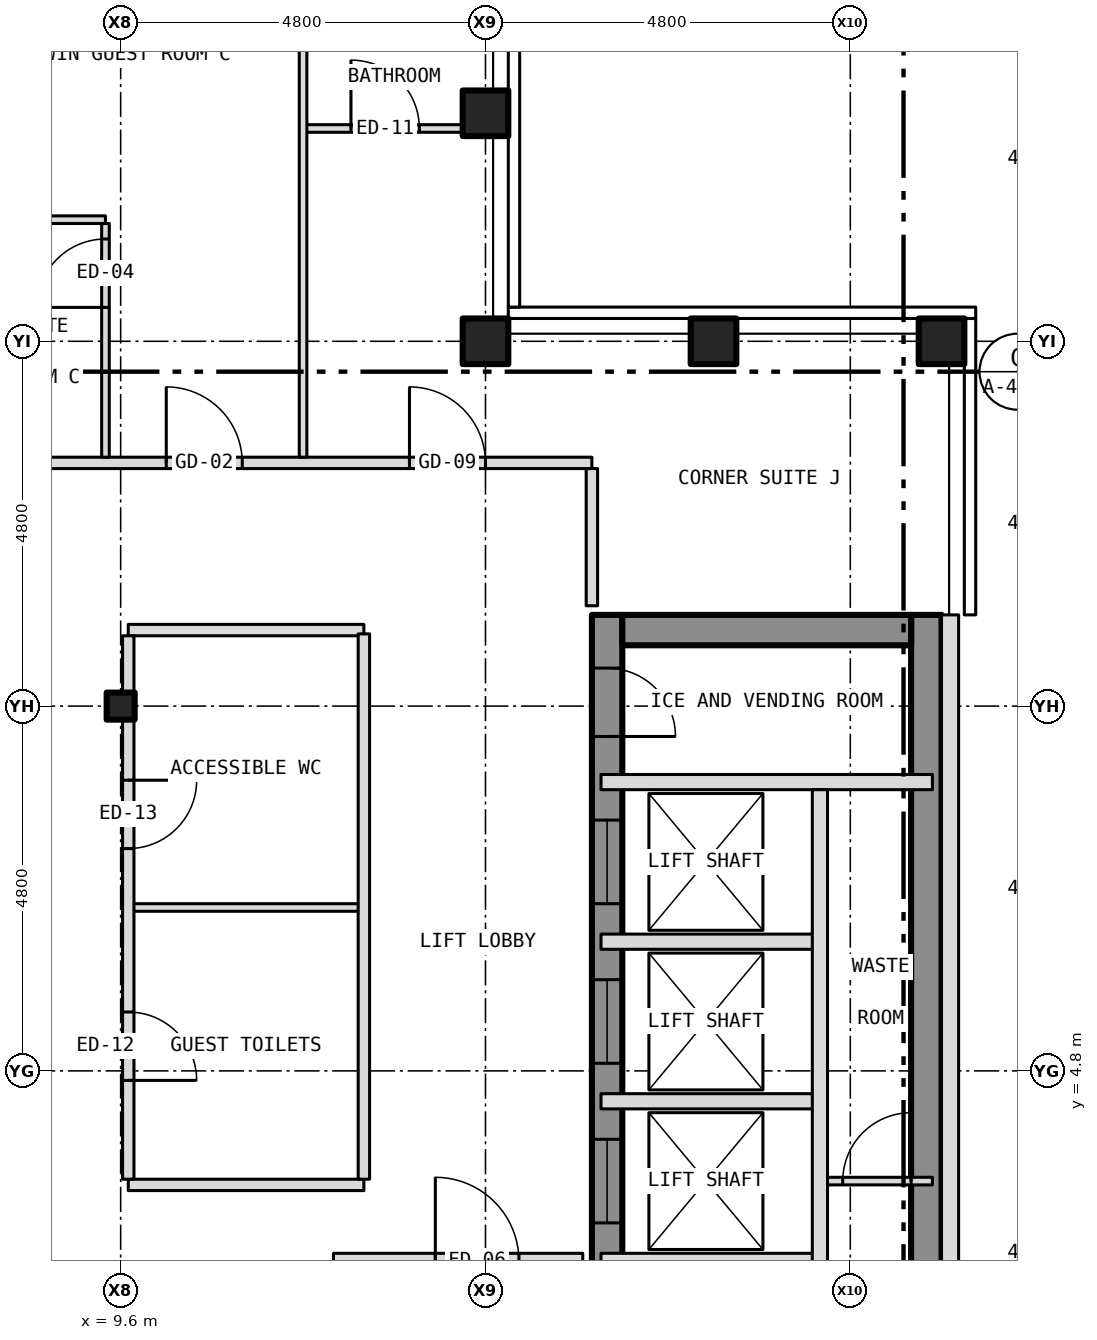
"""IFC4 building model, lengths in metres.
Left out: names, types, materials, properties, quantities, classifications, styles, units other than length and angle.
Written with IfcOpenShell. Run it as: python <this file> out.ifc"""

import sys

from ifc_helpers import new_model, si_unit, direction, frame, frame_2d, origin, origin_2d, place, context, subcontext, project, spatial, rectangle, hollow_rectangle, i_section, extrude, element, fill, save


model = new_model("IFC4")
c1 = context("Model", 3, precision=1e-05, world=origin(), true_north=direction((0.0, 1.0)))
c2 = subcontext(c1, "Body", "Model", "MODEL_VIEW")
j1 = project(units=[si_unit("LENGTHUNIT", "METRE"), si_unit("PLANEANGLEUNIT", "RADIAN")], contexts=[c1])
p1 = place(None, origin())
s1 = spatial("IfcSite", under=j1, at=p1, CompositionType="ELEMENT")
p2 = place(p1, origin())
s2 = spatial("IfcBuilding", under=s1, at=p2, CompositionType="ELEMENT")
p3 = place(p2, frame((0.0, 0.0, 241.0)))
s3 = spatial("IfcBuildingStorey", under=s2, at=p3, CompositionType="ELEMENT", Elevation=241.0)
for number, where, z_axis, x_axis in (
    (1, (20.4, 14.4, -0.15), (0.0, 0.0, 1.0), (1.0, 0.0, 0.0)),
    (2, (14.4, 14.4, -0.15), (0.0, 0.0, 1.0), (1.0, 0.0, 0.0)),
    (3, (14.4, 17.4, -0.15), (0.0, 0.0, 1.0), (1.0, 0.0, 0.0)),
    (4, (17.4, 14.4, -0.15), (0.0, 0.0, 1.0), (1.0, 0.0, 0.0)),
):
    element("IfcColumn", number, at=place(p3, frame(where, z_axis=z_axis, x_axis=x_axis)), inside=s3, PredefinedType="COLUMN", context=c2, shape_type="SweptSolid", body=[
        extrude(hollow_rectangle(XDim=0.6, YDim=0.6, WallThickness=0.03, at=origin_2d()), origin(), (0.0, 0.0, 1.0), 3.5),
    ])
p4 = place(p3, frame((9.6, 9.6, -0.15), z_axis=(0.0, 0.0, 1.0), x_axis=(1.0, 0.0, 0.0)))
e5 = element("IfcColumn", 5, at=p4, inside=s3, PredefinedType="COLUMN", context=c2, shape_type="SweptSolid", body=[
    extrude(i_section(OverallWidth=0.368, OverallDepth=0.356, WebThickness=0.011, FlangeThickness=0.018, at=origin_2d()), origin(), (0.0, 0.0, 1.0), 3.5),
])
p5 = place(p3, frame((16.0, -10.8, 0.0), z_axis=(0.0, 0.0, 1.0), x_axis=(0.0, 1.0, 0.0)))
e6 = element("IfcWall", 6, at=p5, inside=s3, PredefinedType="SHEAR", context=c2, shape_type="SweptSolid", body=[
    extrude(rectangle(XDim=21.6, YDim=0.4, at=frame_2d((10.8, 0.0))), origin(), (0.0, 0.0, 1.0), 3.25),
])
p6 = place(p5, frame((9.4, 0.0, 0.0)))
e7 = element("IfcOpeningElement", 7, at=p6, cuts=e6, PredefinedType="OPENING", context=c2, shape_type="SweptSolid", body=[
    extrude(rectangle(XDim=1.1, YDim=2.1, at=frame_2d((0.55, 1.05))), frame((0.0, 0.212, 0.0), z_axis=(0.0, -1.0, 0.0), x_axis=(1.0, 0.0, 0.0)), (0.0, 0.0, 1.0), 0.424),
])
p7 = place(p5, frame((11.5, 0.0, 0.0)))
e8 = element("IfcOpeningElement", 8, at=p7, cuts=e6, PredefinedType="OPENING", context=c2, shape_type="SweptSolid", body=[
    extrude(rectangle(XDim=1.1, YDim=2.1, at=frame_2d((0.55, 1.05))), frame((0.0, 0.212, 0.0), z_axis=(0.0, -1.0, 0.0), x_axis=(1.0, 0.0, 0.0)), (0.0, 0.0, 1.0), 0.424),
])
p8 = place(p5, frame((13.6, 0.0, 0.0)))
e9 = element("IfcOpeningElement", 9, at=p8, cuts=e6, PredefinedType="OPENING", context=c2, shape_type="SweptSolid", body=[
    extrude(rectangle(XDim=1.1, YDim=2.1, at=frame_2d((0.55, 1.05))), frame((0.0, 0.212, 0.0), z_axis=(0.0, -1.0, 0.0), x_axis=(1.0, 0.0, 0.0)), (0.0, 0.0, 1.0), 0.424),
])
p9 = place(p5, frame((15.7, 0.0, 0.0)))
e10 = element("IfcOpeningElement", 10, at=p9, cuts=e6, PredefinedType="OPENING", context=c2, shape_type="SweptSolid", body=[
    extrude(rectangle(XDim=1.1, YDim=2.1, at=frame_2d((0.55, 1.05))), frame((0.0, 0.212, 0.0), z_axis=(0.0, -1.0, 0.0), x_axis=(1.0, 0.0, 0.0)), (0.0, 0.0, 1.0), 0.424),
])
p10 = place(p5, frame((17.8, 0.0, 0.0)))
e11 = element("IfcOpeningElement", 11, at=p10, cuts=e6, PredefinedType="OPENING", context=c2, shape_type="SweptSolid", body=[
    extrude(rectangle(XDim=1.1, YDim=2.1, at=frame_2d((0.55, 1.05))), frame((0.0, 0.212, 0.0), z_axis=(0.0, -1.0, 0.0), x_axis=(1.0, 0.0, 0.0)), (0.0, 0.0, 1.0), 0.424),
])
p11 = place(p5, frame((5.642, 0.0, 0.0)))
e12 = element("IfcOpeningElement", 12, at=p11, cuts=e6, PredefinedType="OPENING", context=c2, shape_type="SweptSolid", body=[
    extrude(rectangle(XDim=1.1, YDim=2.1, at=frame_2d((0.55, 1.05))), frame((0.0, 0.212, 0.0), z_axis=(0.0, -1.0, 0.0), x_axis=(1.0, 0.0, 0.0)), (0.0, 0.0, 1.0), 0.424),
])
p12 = place(p5, frame((7.5, 0.0, 0.0)))
e13 = element("IfcOpeningElement", 13, at=p12, cuts=e6, PredefinedType="OPENING", context=c2, shape_type="SweptSolid", body=[
    extrude(rectangle(XDim=1.1, YDim=2.1, at=frame_2d((0.55, 1.05))), frame((0.0, 0.212, 0.0), z_axis=(0.0, -1.0, 0.0), x_axis=(1.0, 0.0, 0.0)), (0.0, 0.0, 1.0), 0.424),
])
p13 = place(p5, frame((20.0, 0.0, 0.0)))
e14 = element("IfcOpeningElement", 14, at=p13, cuts=e6, PredefinedType="OPENING", context=c2, shape_type="SweptSolid", body=[
    extrude(rectangle(XDim=0.9, YDim=2.1, at=frame_2d((0.45, 1.05))), frame((0.0, 0.212, 0.0), z_axis=(0.0, -1.0, 0.0), x_axis=(1.0, 0.0, 0.0)), (0.0, 0.0, 1.0), 0.424),
])
p14 = place(p3, frame((20.2, -10.8, 0.0), z_axis=(0.0, 0.0, 1.0), x_axis=(0.0, 1.0, 0.0)))
e15 = element("IfcWall", 15, at=p14, inside=s3, PredefinedType="SHEAR", context=c2, shape_type="SweptSolid", body=[
    extrude(rectangle(XDim=21.6, YDim=0.4, at=frame_2d((10.8, 0.0))), origin(), (0.0, 0.0, 1.0), 3.25),
])
p15 = place(p3, frame((16.2, 10.6, 0.0), z_axis=(0.0, 0.0, 1.0), x_axis=(1.0, 0.0, 0.0)))
e16 = element("IfcWall", 16, at=p15, inside=s3, PredefinedType="SHEAR", context=c2, shape_type="SweptSolid", body=[
    extrude(rectangle(XDim=3.8, YDim=0.4, at=frame_2d((1.9, 0.0))), origin(), (0.0, 0.0, 1.0), 3.25),
])
p16 = place(p3, frame((20.512, -10.8, 0.0), z_axis=(0.0, 0.0, 1.0), x_axis=(0.0, 1.0, 0.0)))
e17 = element("IfcWall", 17, at=p16, inside=s3, PredefinedType="SOLIDWALL", context=c2, shape_type="SweptSolid", body=[
    extrude(rectangle(XDim=21.6, YDim=0.225, at=frame_2d((10.8, 0.0))), origin(), (0.0, 0.0, 1.0), 3.5),
])
p17 = place(p16, frame((2.95, 0.0, 1.0)))
e18 = element("IfcOpeningElement", 18, at=p17, cuts=e17, PredefinedType="OPENING", context=c2, shape_type="SweptSolid", body=[
    extrude(rectangle(XDim=0.6, YDim=1.5, at=frame_2d((0.3, 0.75))), frame((0.0, 0.125, 0.0), z_axis=(0.0, -1.0, 0.0), x_axis=(1.0, 0.0, 0.0)), (0.0, 0.0, 1.0), 0.249),
])
p18 = place(p3, frame((12.4, 2.3, 0.0), z_axis=(0.0, 0.0, 1.0), x_axis=(1.0, 0.0, 0.0)))
e19 = element("IfcWall", 19, at=p18, inside=s3, PredefinedType="PARTITIONING", context=c2, shape_type="SweptSolid", body=[
    extrude(rectangle(XDim=3.28, YDim=0.2, at=frame_2d((1.64, 0.0))), origin(), (0.0, 0.0, 1.0), 3.35),
])
p19 = place(p18, frame((1.34, 0.0, 0.0)))
e20 = element("IfcOpeningElement", 20, at=p19, cuts=e19, PredefinedType="OPENING", context=c2, shape_type="SweptSolid", body=[
    extrude(rectangle(XDim=1.1, YDim=2.1, at=frame_2d((0.55, 1.05))), frame((0.0, 0.112, 0.0), z_axis=(0.0, -1.0, 0.0), x_axis=(1.0, 0.0, 0.0)), (0.0, 0.0, 1.0), 0.224),
])
p20 = place(p3, frame((15.92, 2.3, 0.0), z_axis=(0.0, 0.0, 1.0), x_axis=(1.0, 0.0, 0.0)))
e21 = element("IfcWall", 21, at=p20, inside=s3, PredefinedType="PARTITIONING", context=c2, shape_type="SweptSolid", body=[
    extrude(rectangle(XDim=2.88, YDim=0.2, at=frame_2d((1.44, 0.0))), origin(), (0.0, 0.0, 1.0), 3.25),
])
p21 = place(p3, frame((9.7, 3.3, 0.0), z_axis=(0.0, 0.0, 1.0), x_axis=(1.0, 0.0, 0.0)))
e22 = element("IfcWall", 22, at=p21, inside=s3, PredefinedType="PARTITIONING", context=c2, shape_type="SweptSolid", body=[
    extrude(rectangle(XDim=3.1, YDim=0.15, at=frame_2d((1.55, 0.0))), origin(), (0.0, 0.0, 1.0), 3.35),
])
p22 = place(p3, frame((18.8, 3.35, 0.0), z_axis=(0.0, 0.0, 1.0), x_axis=(1.0, 0.0, 0.0)))
e23 = element("IfcWall", 23, at=p22, inside=s3, PredefinedType="PARTITIONING", context=c2, shape_type="SweptSolid", body=[
    extrude(rectangle(XDim=1.48, YDim=0.1, at=frame_2d((0.74, 0.0))), origin(), (0.0, 0.0, 1.0), 3.25),
])
p23 = place(p22, frame((0.3, 0.0, 0.0)))
e24 = element("IfcOpeningElement", 24, at=p23, cuts=e23, PredefinedType="OPENING", context=c2, shape_type="SweptSolid", body=[
    extrude(rectangle(XDim=0.9, YDim=2.1, at=frame_2d((0.45, 1.05))), frame((0.0, 0.062, 0.0), z_axis=(0.0, -1.0, 0.0), x_axis=(1.0, 0.0, 0.0)), (0.0, 0.0, 1.0), 0.124),
])
for number, where, z_axis, x_axis in (
    (25, (15.92, 4.4, 0.0), (0.0, 0.0, 1.0), (1.0, 0.0, 0.0)),
    (26, (15.92, 6.5, 0.0), (0.0, 0.0, 1.0), (1.0, 0.0, 0.0)),
):
    element("IfcWall", number, at=place(p3, frame(where, z_axis=z_axis, x_axis=x_axis)), inside=s3, PredefinedType="PARTITIONING", context=c2, shape_type="SweptSolid", body=[
        extrude(rectangle(XDim=2.88, YDim=0.2, at=frame_2d((1.44, 0.0))), origin(), (0.0, 0.0, 1.0), 3.25),
    ])
p24 = place(p3, frame((9.7, 6.95, 0.0), z_axis=(0.0, 0.0, 1.0), x_axis=(1.0, 0.0, 0.0)))
e27 = element("IfcWall", 27, at=p24, inside=s3, PredefinedType="PARTITIONING", context=c2, shape_type="SweptSolid", body=[
    extrude(rectangle(XDim=3.1, YDim=0.1, at=frame_2d((1.55, 0.0))), origin(), (0.0, 0.0, 1.0), 3.35),
])
p25 = place(p3, frame((15.92, 8.6, 0.0), z_axis=(0.0, 0.0, 1.0), x_axis=(1.0, 0.0, 0.0)))
e28 = element("IfcWall", 28, at=p25, inside=s3, PredefinedType="PARTITIONING", context=c2, shape_type="SweptSolid", body=[
    extrude(rectangle(XDim=4.36, YDim=0.2, at=frame_2d((2.18, 0.0))), origin(), (0.0, 0.0, 1.0), 3.25),
])
p26 = place(p3, frame((9.7, 10.6, 0.0), z_axis=(0.0, 0.0, 1.0), x_axis=(1.0, 0.0, 0.0)))
e29 = element("IfcWall", 29, at=p26, inside=s3, PredefinedType="PARTITIONING", context=c2, shape_type="SweptSolid", body=[
    extrude(rectangle(XDim=3.1, YDim=0.15, at=frame_2d((1.55, 0.0))), origin(), (0.0, 0.0, 1.0), 3.35),
])
p27 = place(p3, frame((-15.8, 12.8, 0.0), z_axis=(0.0, 0.0, 1.0), x_axis=(1.0, 0.0, 0.0)))
e30 = element("IfcWall", 30, at=p27, inside=s3, PredefinedType="PARTITIONING", context=c2, shape_type="SweptSolid", body=[
    extrude(rectangle(XDim=31.6, YDim=0.15, at=frame_2d((15.8, 0.0))), origin(), (0.0, 0.0, 1.0), 3.35),
])
p28 = place(p27, frame((6.8, 0.0, 0.0)))
e31 = element("IfcOpeningElement", 31, at=p28, cuts=e30, PredefinedType="OPENING", context=c2, shape_type="SweptSolid", body=[
    extrude(rectangle(XDim=1.0, YDim=2.1, at=frame_2d((0.5, 1.05))), frame((0.0, 0.087, 0.0), z_axis=(0.0, -1.0, 0.0), x_axis=(1.0, 0.0, 0.0)), (0.0, 0.0, 1.0), 0.174),
])
p29 = place(p27, frame((15.35, 0.0, 0.0)))
e32 = element("IfcOpeningElement", 32, at=p29, cuts=e30, PredefinedType="OPENING", context=c2, shape_type="SweptSolid", body=[
    extrude(rectangle(XDim=0.9, YDim=2.1, at=frame_2d((0.45, 1.05))), frame((0.0, 0.087, 0.0), z_axis=(0.0, -1.0, 0.0), x_axis=(1.0, 0.0, 0.0)), (0.0, 0.0, 1.0), 0.174),
])
p30 = place(p27, frame((26.0, 0.0, 0.0)))
e33 = element("IfcOpeningElement", 33, at=p30, cuts=e30, PredefinedType="OPENING", context=c2, shape_type="SweptSolid", body=[
    extrude(rectangle(XDim=1.0, YDim=2.1, at=frame_2d((0.5, 1.05))), frame((0.0, 0.087, 0.0), z_axis=(0.0, -1.0, 0.0), x_axis=(1.0, 0.0, 0.0)), (0.0, 0.0, 1.0), 0.174),
])
p31 = place(p27, frame((1.4, 0.0, 0.0)))
e34 = element("IfcOpeningElement", 34, at=p31, cuts=e30, PredefinedType="OPENING", context=c2, shape_type="SweptSolid", body=[
    extrude(rectangle(XDim=1.0, YDim=2.1, at=frame_2d((0.5, 1.05))), frame((0.0, 0.087, 0.0), z_axis=(0.0, -1.0, 0.0), x_axis=(1.0, 0.0, 0.0)), (0.0, 0.0, 1.0), 0.174),
])
p32 = place(p27, frame((29.2, 0.0, 0.0)))
e35 = element("IfcOpeningElement", 35, at=p32, cuts=e30, PredefinedType="OPENING", context=c2, shape_type="SweptSolid", body=[
    extrude(rectangle(XDim=1.0, YDim=2.1, at=frame_2d((0.5, 1.05))), frame((0.0, 0.087, 0.0), z_axis=(0.0, -1.0, 0.0), x_axis=(1.0, 0.0, 0.0)), (0.0, 0.0, 1.0), 0.174),
])
p33 = place(p3, frame((5.0, 16.0, 0.0), z_axis=(0.0, 0.0, 1.0), x_axis=(1.0, 0.0, 0.0)))
e36 = element("IfcWall", 36, at=p33, inside=s3, PredefinedType="PARTITIONING", context=c2, shape_type="SweptSolid", body=[
    extrude(rectangle(XDim=4.4, YDim=0.1, at=frame_2d((2.2, 0.0))), origin(), (0.0, 0.0, 1.0), 3.35),
])
p34 = place(p3, frame((12.0, 17.2, 0.0), z_axis=(0.0, 0.0, 1.0), x_axis=(1.0, 0.0, 0.0)))
e37 = element("IfcWall", 37, at=p34, inside=s3, PredefinedType="PARTITIONING", context=c2, shape_type="SweptSolid", body=[
    extrude(rectangle(XDim=2.28, YDim=0.1, at=frame_2d((1.14, 0.0))), origin(), (0.0, 0.0, 1.0), 3.35),
])
p35 = place(p34, frame((0.63, 0.0, 0.0)))
e38 = element("IfcOpeningElement", 38, at=p35, cuts=e37, PredefinedType="OPENING", context=c2, shape_type="SweptSolid", body=[
    extrude(rectangle(XDim=0.9, YDim=2.1, at=frame_2d((0.45, 1.05))), frame((0.0, 0.062, 0.0), z_axis=(0.0, -1.0, 0.0), x_axis=(1.0, 0.0, 0.0)), (0.0, 0.0, 1.0), 0.124),
])
p36 = place(p3, frame((9.4, 12.875, 0.0), z_axis=(0.0, 0.0, 1.0), x_axis=(0.0, 1.0, 0.0)))
e39 = element("IfcWall", 39, at=p36, inside=s3, PredefinedType="PARTITIONING", context=c2, shape_type="SweptSolid", body=[
    extrude(rectangle(XDim=3.075, YDim=0.1, at=frame_2d((1.538, 0.0))), origin(), (0.0, 0.0, 1.0), 2.728),
])
p37 = place(p36, frame((1.971, 0.0, 0.0)))
e40 = element("IfcOpeningElement", 40, at=p37, cuts=e39, PredefinedType="OPENING", context=c2, shape_type="SweptSolid", body=[
    extrude(rectangle(XDim=0.9, YDim=2.1, at=frame_2d((0.45, 1.05))), frame((0.0, 0.062, 0.0), z_axis=(0.0, -1.0, 0.0), x_axis=(1.0, 0.0, 0.0)), (0.0, 0.0, 1.0), 0.124),
])
p38 = place(p3, frame((9.7, 3.375, 0.0), z_axis=(0.0, 0.0, 1.0), x_axis=(0.0, 1.0, 0.0)))
e41 = element("IfcWall", 41, at=p38, inside=s3, PredefinedType="PARTITIONING", context=c2, shape_type="SweptSolid", body=[
    extrude(rectangle(XDim=6.041, YDim=0.15, at=frame_2d((3.021, 0.0))), origin(), (0.0, 0.0, 1.0), 2.728),
])
p39 = place(p38, frame((1.3, 0.0, 0.0)))
e42 = element("IfcOpeningElement", 42, at=p39, cuts=e41, PredefinedType="OPENING", context=c2, shape_type="SweptSolid", body=[
    extrude(rectangle(XDim=0.9, YDim=2.1, at=frame_2d((0.45, 1.05))), frame((0.0, 0.087, 0.0), z_axis=(0.0, -1.0, 0.0), x_axis=(1.0, 0.0, 0.0)), (0.0, 0.0, 1.0), 0.174),
])
p40 = place(p38, frame((4.35, 0.0, 0.0)))
e43 = element("IfcOpeningElement", 43, at=p40, cuts=e41, PredefinedType="OPENING", context=c2, shape_type="SweptSolid", body=[
    extrude(rectangle(XDim=0.9, YDim=2.1, at=frame_2d((0.45, 1.05))), frame((0.0, 0.087, 0.0), z_axis=(0.0, -1.0, 0.0), x_axis=(1.0, 0.0, 0.0)), (0.0, 0.0, 1.0), 0.174),
])
p41 = place(p3, frame((9.7, 9.416, 0.0), z_axis=(0.0, 0.0, 1.0), x_axis=(0.0, 1.0, 0.0)))
e44 = element("IfcWall", 44, at=p41, inside=s3, PredefinedType="PARTITIONING", context=c2, shape_type="SweptSolid", body=[
    extrude(rectangle(XDim=0.368, YDim=0.15, at=frame_2d((0.184, 0.0))), origin(), (0.0, 0.0, 1.0), 3.35),
])
p42 = place(p3, frame((9.7, 9.784, 0.0), z_axis=(0.0, 0.0, 1.0), x_axis=(0.0, 1.0, 0.0)))
e45 = element("IfcWall", 45, at=p42, inside=s3, PredefinedType="PARTITIONING", context=c2, shape_type="SweptSolid", body=[
    extrude(rectangle(XDim=0.741, YDim=0.15, at=frame_2d((0.371, 0.0))), origin(), (0.0, 0.0, 1.0), 2.728),
])
p43 = place(p3, frame((12.0, 12.875, 0.0), z_axis=(0.0, 0.0, 1.0), x_axis=(0.0, 1.0, 0.0)))
e46 = element("IfcWall", 46, at=p43, inside=s3, PredefinedType="PARTITIONING", context=c2, shape_type="SweptSolid", body=[
    extrude(rectangle(XDim=7.855, YDim=0.1, at=frame_2d((3.927, 0.0))), origin(), (0.0, 0.0, 1.0), 3.35),
])
p44 = place(p3, frame((12.8, 3.375, 0.0), z_axis=(0.0, 0.0, 1.0), x_axis=(0.0, 1.0, 0.0)))
e47 = element("IfcWall", 47, at=p44, inside=s3, PredefinedType="PARTITIONING", context=c2, shape_type="SweptSolid", body=[
    extrude(rectangle(XDim=7.175, YDim=0.15, at=frame_2d((3.587, 0.0))), origin(), (0.0, 0.0, 1.0), 3.35),
])
p45 = place(p3, frame((15.8, 10.92, 0.0), z_axis=(0.0, 0.0, 1.0), x_axis=(0.0, 1.0, 0.0)))
e48 = element("IfcWall", 48, at=p45, inside=s3, PredefinedType="PARTITIONING", context=c2, shape_type="SweptSolid", body=[
    extrude(rectangle(XDim=1.805, YDim=0.15, at=frame_2d((0.903, 0.0))), origin(), (0.0, 0.0, 1.0), 3.35),
])
p46 = place(p3, frame((18.8, -1.8, 0.0), z_axis=(0.0, 0.0, 1.0), x_axis=(0.0, 1.0, 0.0)))
e49 = element("IfcWall", 49, at=p46, inside=s3, PredefinedType="PARTITIONING", context=c2, shape_type="SweptSolid", body=[
    extrude(rectangle(XDim=10.3, YDim=0.2, at=frame_2d((5.15, 0.0))), origin(), (0.0, 0.0, 1.0), 3.25),
])
p47 = place(p8, origin())
e50 = element("IfcDoor", 50, at=p47, inside=s3, OperationType="SLIDING_TO_LEFT", PredefinedType="DOOR", context=c2, shape_type="SweptSolid", body=[
    extrude(rectangle(XDim=1.1, YDim=2.1, at=frame_2d((0.55, 1.05))), frame((0.0, 0.025, 0.0), z_axis=(0.0, -1.0, 0.0), x_axis=(1.0, 0.0, 0.0)), (0.0, 0.0, 1.0), 0.05),
])
fill(e9, e50)
p48 = place(p9, origin())
e51 = element("IfcDoor", 51, at=p48, inside=s3, OperationType="SLIDING_TO_LEFT", PredefinedType="DOOR", context=c2, shape_type="SweptSolid", body=[
    extrude(rectangle(XDim=1.1, YDim=2.1, at=frame_2d((0.55, 1.05))), frame((0.0, 0.025, 0.0), z_axis=(0.0, -1.0, 0.0), x_axis=(1.0, 0.0, 0.0)), (0.0, 0.0, 1.0), 0.05),
])
fill(e10, e51)
p49 = place(p10, origin())
e52 = element("IfcDoor", 52, at=p49, inside=s3, OperationType="SLIDING_TO_LEFT", PredefinedType="DOOR", context=c2, shape_type="SweptSolid", body=[
    extrude(rectangle(XDim=1.1, YDim=2.1, at=frame_2d((0.55, 1.05))), frame((0.0, 0.025, 0.0), z_axis=(0.0, -1.0, 0.0), x_axis=(1.0, 0.0, 0.0)), (0.0, 0.0, 1.0), 0.05),
])
fill(e11, e52)
p50 = place(p13, origin())
e53 = element("IfcDoor", 53, at=p50, inside=s3, OperationType="SINGLE_SWING_LEFT", PredefinedType="DOOR", context=c2, shape_type="SweptSolid", body=[
    extrude(rectangle(XDim=0.9, YDim=2.1, at=frame_2d((0.45, 1.05))), frame((0.0, 0.025, 0.0), z_axis=(0.0, -1.0, 0.0), x_axis=(1.0, 0.0, 0.0)), (0.0, 0.0, 1.0), 0.05),
])
fill(e14, e53)
p51 = place(p23, origin())
e54 = element("IfcDoor", 54, at=p51, inside=s3, OperationType="SINGLE_SWING_RIGHT", PredefinedType="DOOR", context=c2, shape_type="SweptSolid", body=[
    extrude(rectangle(XDim=0.9, YDim=2.1, at=frame_2d((0.45, 1.05))), frame((0.0, 0.025, 0.0), z_axis=(0.0, -1.0, 0.0), x_axis=(1.0, 0.0, 0.0)), (0.0, 0.0, 1.0), 0.05),
])
fill(e24, e54)
p52 = place(p19, origin())
e55 = element("IfcDoor", 55, at=p52, inside=s3, OperationType="SINGLE_SWING_LEFT", PredefinedType="DOOR", context=c2, shape_type="SweptSolid", body=[
    extrude(rectangle(XDim=1.1, YDim=2.1, at=frame_2d((0.55, 1.05))), frame((0.0, 0.025, 0.0), z_axis=(0.0, -1.0, 0.0), x_axis=(1.0, 0.0, 0.0)), (0.0, 0.0, 1.0), 0.05),
])
fill(e20, e55)
p53 = place(p30, origin())
e56 = element("IfcDoor", 56, at=p53, inside=s3, OperationType="SINGLE_SWING_LEFT", PredefinedType="DOOR", context=c2, shape_type="SweptSolid", body=[
    extrude(rectangle(XDim=1.0, YDim=2.1, at=frame_2d((0.5, 1.05))), frame((0.0, 0.025, 0.0), z_axis=(0.0, -1.0, 0.0), x_axis=(1.0, 0.0, 0.0)), (0.0, 0.0, 1.0), 0.05),
])
fill(e33, e56)
p54 = place(p37, origin())
e57 = element("IfcDoor", 57, at=p54, inside=s3, OperationType="SINGLE_SWING_LEFT", PredefinedType="DOOR", context=c2, shape_type="SweptSolid", body=[
    extrude(rectangle(XDim=0.9, YDim=2.1, at=frame_2d((0.45, 1.05))), frame((0.0, 0.025, 0.0), z_axis=(0.0, -1.0, 0.0), x_axis=(1.0, 0.0, 0.0)), (0.0, 0.0, 1.0), 0.05),
])
fill(e40, e57)
p55 = place(p35, origin())
e58 = element("IfcDoor", 58, at=p55, inside=s3, OperationType="SINGLE_SWING_LEFT", PredefinedType="DOOR", context=c2, shape_type="SweptSolid", body=[
    extrude(rectangle(XDim=0.9, YDim=2.1, at=frame_2d((0.45, 1.05))), frame((0.0, 0.025, 0.0), z_axis=(0.0, -1.0, 0.0), x_axis=(1.0, 0.0, 0.0)), (0.0, 0.0, 1.0), 0.05),
])
fill(e38, e58)
p56 = place(p32, origin())
e59 = element("IfcDoor", 59, at=p56, inside=s3, OperationType="SINGLE_SWING_LEFT", PredefinedType="DOOR", context=c2, shape_type="SweptSolid", body=[
    extrude(rectangle(XDim=1.0, YDim=2.1, at=frame_2d((0.5, 1.05))), frame((0.0, 0.025, 0.0), z_axis=(0.0, -1.0, 0.0), x_axis=(1.0, 0.0, 0.0)), (0.0, 0.0, 1.0), 0.05),
])
fill(e35, e59)
p57 = place(p39, origin())
e60 = element("IfcDoor", 60, at=p57, inside=s3, OperationType="SINGLE_SWING_LEFT", PredefinedType="DOOR", context=c2, shape_type="SweptSolid", body=[
    extrude(rectangle(XDim=0.9, YDim=2.1, at=frame_2d((0.45, 1.05))), frame((0.0, 0.025, 0.0), z_axis=(0.0, -1.0, 0.0), x_axis=(1.0, 0.0, 0.0)), (0.0, 0.0, 1.0), 0.05),
])
fill(e42, e60)
p58 = place(p40, origin())
e61 = element("IfcDoor", 61, at=p58, inside=s3, OperationType="SINGLE_SWING_RIGHT", PredefinedType="DOOR", context=c2, shape_type="SweptSolid", body=[
    extrude(rectangle(XDim=0.9, YDim=2.1, at=frame_2d((0.45, 1.05))), frame((0.0, 0.025, 0.0), z_axis=(0.0, -1.0, 0.0), x_axis=(1.0, 0.0, 0.0)), (0.0, 0.0, 1.0), 0.05),
])
fill(e43, e61)
save(model, sys.argv[1])
